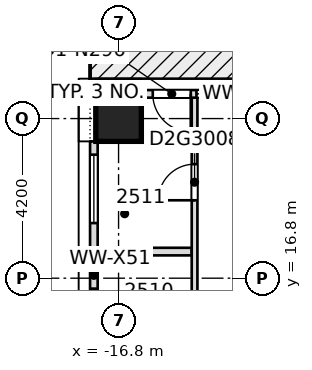
"""IFC4 building model, lengths in metres.
Left out: names, types, materials, properties, quantities, classifications, styles, units other than length and angle.
Written with IfcOpenShell. Run it as: python <this file> out.ifc"""

import sys

from ifc_helpers import new_model, si_unit, direction, frame, frame_2d, origin, origin_2d, place, context, subcontext, project, spatial, rectangle, extrude, element, fill, save


model = new_model("IFC4")
c1 = context("Model", 3, precision=1e-05, world=origin(), true_north=direction((0.0, 1.0)))
c2 = subcontext(c1, "Body", "Model", "MODEL_VIEW")
j1 = project(units=[si_unit("LENGTHUNIT", "METRE"), si_unit("PLANEANGLEUNIT", "RADIAN")], contexts=[c1])
p1 = place(None, origin())
s1 = spatial("IfcSite", under=j1, at=p1, CompositionType="ELEMENT")
p2 = place(p1, origin())
s2 = spatial("IfcBuilding", under=s1, at=p2, CompositionType="ELEMENT")
p3 = place(p2, frame((0.0, 0.0, 101.1)))
s3 = spatial("IfcBuildingStorey", under=s2, at=p3, CompositionType="ELEMENT", Elevation=101.1)
p4 = place(p3, frame((-16.8, 21.0, -0.32), z_axis=(0.0, 0.0, 1.0), x_axis=(1.0, 0.0, 0.0)))
e1 = element("IfcColumn", 1, at=p4, inside=s3, PredefinedType="COLUMN", context=c2, shape_type="SweptSolid", body=[
    extrude(rectangle(XDim=1.2, YDim=1.2, at=origin_2d()), origin(), (0.0, 0.0, 1.0), 3.45),
])
p5 = place(p3, frame((-17.35, 17.5, 0.0), z_axis=(0.0, 0.0, 1.0), x_axis=(1.0, 0.0, 0.0)))
e2 = element("IfcWall", 2, at=p5, inside=s3, PredefinedType="PARTITIONING", context=c2, shape_type="SweptSolid", body=[
    extrude(rectangle(XDim=2.475, YDim=0.2, at=frame_2d((1.238, 0.0))), origin(), (0.0, 0.0, 1.0), 3.13),
])
p6 = place(p3, frame((-14.8, -10.6, 0.0), z_axis=(0.0, 0.0, 1.0), x_axis=(0.0, 1.0, 0.0)))
e3 = element("IfcWall", 3, at=p6, inside=s3, PredefinedType="PARTITIONING", context=c2, shape_type="SweptSolid", body=[
    extrude(rectangle(XDim=32.15, YDim=0.15, at=frame_2d((16.075, 0.0))), origin(), (0.0, 0.0, 1.0), 3.13),
])
p7 = place(p6, frame((1.05, 0.0, 0.0)))
e4 = element("IfcOpeningElement", 4, at=p7, cuts=e3, PredefinedType="OPENING", context=c2, shape_type="SweptSolid", body=[
    extrude(rectangle(XDim=0.95, YDim=2.1, at=frame_2d((0.475, 1.05))), frame((0.0, 0.085, 0.0), z_axis=(0.0, -1.0, 0.0), x_axis=(1.0, 0.0, 0.0)), (0.0, 0.0, 1.0), 0.17),
])
p8 = place(p6, frame((16.1, 0.0, 0.0)))
e5 = element("IfcOpeningElement", 5, at=p8, cuts=e3, PredefinedType="OPENING", context=c2, shape_type="SweptSolid", body=[
    extrude(rectangle(XDim=1.0, YDim=2.1, at=frame_2d((0.5, 1.05))), frame((0.0, 0.085, 0.0), z_axis=(0.0, -1.0, 0.0), x_axis=(1.0, 0.0, 0.0)), (0.0, 0.0, 1.0), 0.17),
])
p9 = place(p6, frame((21.1, 0.0, 0.0)))
e6 = element("IfcOpeningElement", 6, at=p9, cuts=e3, PredefinedType="OPENING", context=c2, shape_type="SweptSolid", body=[
    extrude(rectangle(XDim=0.95, YDim=2.1, at=frame_2d((0.475, 1.05))), frame((0.0, 0.085, 0.0), z_axis=(0.0, -1.0, 0.0), x_axis=(1.0, 0.0, 0.0)), (0.0, 0.0, 1.0), 0.17),
])
p10 = place(p6, frame((25.55, 0.0, 0.0)))
e7 = element("IfcOpeningElement", 7, at=p10, cuts=e3, PredefinedType="OPENING", context=c2, shape_type="SweptSolid", body=[
    extrude(rectangle(XDim=0.95, YDim=2.1, at=frame_2d((0.475, 1.05))), frame((0.0, 0.085, 0.0), z_axis=(0.0, -1.0, 0.0), x_axis=(1.0, 0.0, 0.0)), (0.0, 0.0, 1.0), 0.17),
])
p11 = place(p6, frame((29.45, 0.0, 0.0)))
e8 = element("IfcOpeningElement", 8, at=p11, cuts=e3, PredefinedType="OPENING", context=c2, shape_type="SweptSolid", body=[
    extrude(rectangle(XDim=0.95, YDim=2.1, at=frame_2d((0.475, 1.05))), frame((0.0, 0.085, 0.0), z_axis=(0.0, -1.0, 0.0), x_axis=(1.0, 0.0, 0.0)), (0.0, 0.0, 1.0), 0.17),
])
p12 = place(p6, frame((10.05, 0.0, 0.0)))
e9 = element("IfcOpeningElement", 9, at=p12, cuts=e3, PredefinedType="OPENING", context=c2, shape_type="SweptSolid", body=[
    extrude(rectangle(XDim=1.1, YDim=2.1, at=frame_2d((0.55, 1.05))), frame((0.0, 0.085, 0.0), z_axis=(0.0, -1.0, 0.0), x_axis=(1.0, 0.0, 0.0)), (0.0, 0.0, 1.0), 0.17),
])
p13 = place(p6, frame((4.85, 0.0, 0.0)))
e10 = element("IfcOpeningElement", 10, at=p13, cuts=e3, PredefinedType="OPENING", context=c2, shape_type="SweptSolid", body=[
    extrude(rectangle(XDim=1.0, YDim=2.1, at=frame_2d((0.5, 1.05))), frame((0.0, 0.085, 0.0), z_axis=(0.0, -1.0, 0.0), x_axis=(1.0, 0.0, 0.0)), (0.0, 0.0, 1.0), 0.17),
])
p14 = place(p3, frame((-12.6, 21.65, 0.0), z_axis=(0.0, 0.0, 1.0), x_axis=(-1.0, 0.0, 0.0)))
e11 = element("IfcWall", 11, at=p14, inside=s3, PredefinedType="STANDARD", context=c2, shape_type="SweptSolid", body=[
    extrude(rectangle(XDim=3.6, YDim=0.2, at=frame_2d((1.8, 0.0))), origin(), (0.0, 0.0, 1.0), 3.13),
])
p15 = place(p14, frame((0.35, 0.0, 0.2)))
e12 = element("IfcOpeningElement", 12, at=p15, cuts=e11, PredefinedType="OPENING", context=c2, shape_type="SweptSolid", body=[
    extrude(rectangle(XDim=1.8, YDim=2.65, at=frame_2d((0.9, 1.325))), frame((0.0, 0.11, 0.0), z_axis=(0.0, -1.0, 0.0), x_axis=(1.0, 0.0, 0.0)), (0.0, 0.0, 1.0), 0.22),
])
p16 = place(p14, frame((2.3, 0.0, 0.0)))
e13 = element("IfcOpeningElement", 13, at=p16, cuts=e11, PredefinedType="OPENING", context=c2, shape_type="SweptSolid", body=[
    extrude(rectangle(XDim=1.0, YDim=2.4, at=frame_2d((0.5, 1.2))), frame((0.0, 0.11, 0.0), z_axis=(0.0, -1.0, 0.0), x_axis=(1.0, 0.0, 0.0)), (0.0, 0.0, 1.0), 0.22),
])
p17 = place(p3, frame((-17.45, 20.4, 0.0), z_axis=(0.0, 0.0, 1.0), x_axis=(0.0, -1.0, 0.0)))
e14 = element("IfcWall", 14, at=p17, inside=s3, PredefinedType="STANDARD", context=c2, shape_type="SweptSolid", body=[
    extrude(rectangle(XDim=7.05, YDim=0.2, at=frame_2d((3.525, 0.0))), origin(), (0.0, 0.0, 1.0), 3.13),
])
p18 = place(p17, frame((3.875, 0.0, 0.2)))
e15 = element("IfcOpeningElement", 15, at=p18, cuts=e14, PredefinedType="OPENING", context=c2, shape_type="SweptSolid", body=[
    extrude(rectangle(XDim=1.8, YDim=2.65, at=frame_2d((0.9, 1.325))), frame((0.0, 0.11, 0.0), z_axis=(0.0, -1.0, 0.0), x_axis=(1.0, 0.0, 0.0)), (0.0, 0.0, 1.0), 0.22),
])
p19 = place(p17, frame((0.35, 0.0, 0.2)))
e16 = element("IfcOpeningElement", 16, at=p19, cuts=e14, PredefinedType="OPENING", context=c2, shape_type="SweptSolid", body=[
    extrude(rectangle(XDim=1.8, YDim=2.65, at=frame_2d((0.9, 1.325))), frame((0.0, 0.11, 0.0), z_axis=(0.0, -1.0, 0.0), x_axis=(1.0, 0.0, 0.0)), (0.0, 0.0, 1.0), 0.22),
])
p20 = place(p11, origin())
e17 = element("IfcDoor", 17, at=p20, inside=s3, OperationType="SINGLE_SWING_RIGHT", PredefinedType="DOOR", context=c2, shape_type="SweptSolid", body=[
    extrude(rectangle(XDim=0.95, YDim=2.1, at=frame_2d((0.475, 1.05))), frame((0.0, 0.025, 0.0), z_axis=(0.0, -1.0, 0.0), x_axis=(1.0, 0.0, 0.0)), (0.0, 0.0, 1.0), 0.05),
])
fill(e8, e17)
p21 = place(p15, origin())
e18 = element("IfcWindow", 18, at=p21, inside=s3, PartitioningType="SINGLE_PANEL", PredefinedType="WINDOW", context=c2, shape_type="SweptSolid", body=[
    extrude(rectangle(XDim=1.8, YDim=2.65, at=frame_2d((0.9, 1.325))), frame((0.0, 0.03, 0.0), z_axis=(0.0, -1.0, 0.0), x_axis=(1.0, 0.0, 0.0)), (0.0, 0.0, 1.0), 0.06),
])
fill(e12, e18)
p22 = place(p16, origin())
e19 = element("IfcDoor", 19, at=p22, inside=s3, OperationType="SINGLE_SWING_LEFT", PredefinedType="DOOR", context=c2, shape_type="SweptSolid", body=[
    extrude(rectangle(XDim=1.0, YDim=2.4, at=frame_2d((0.5, 1.2))), frame((0.0, 0.025, 0.0), z_axis=(0.0, -1.0, 0.0), x_axis=(1.0, 0.0, 0.0)), (0.0, 0.0, 1.0), 0.05),
])
fill(e13, e19)
p23 = place(p18, origin())
e20 = element("IfcWindow", 20, at=p23, inside=s3, PartitioningType="SINGLE_PANEL", PredefinedType="WINDOW", context=c2, shape_type="SweptSolid", body=[
    extrude(rectangle(XDim=1.8, YDim=2.65, at=frame_2d((0.9, 1.325))), frame((0.0, 0.03, 0.0), z_axis=(0.0, -1.0, 0.0), x_axis=(1.0, 0.0, 0.0)), (0.0, 0.0, 1.0), 0.06),
])
fill(e15, e20)
p24 = place(p19, origin())
e21 = element("IfcWindow", 21, at=p24, inside=s3, PartitioningType="SINGLE_PANEL", PredefinedType="WINDOW", context=c2, shape_type="SweptSolid", body=[
    extrude(rectangle(XDim=1.8, YDim=2.65, at=frame_2d((0.9, 1.325))), frame((0.0, 0.03, 0.0), z_axis=(0.0, -1.0, 0.0), x_axis=(1.0, 0.0, 0.0)), (0.0, 0.0, 1.0), 0.06),
])
fill(e16, e21)
save(model, sys.argv[1])
